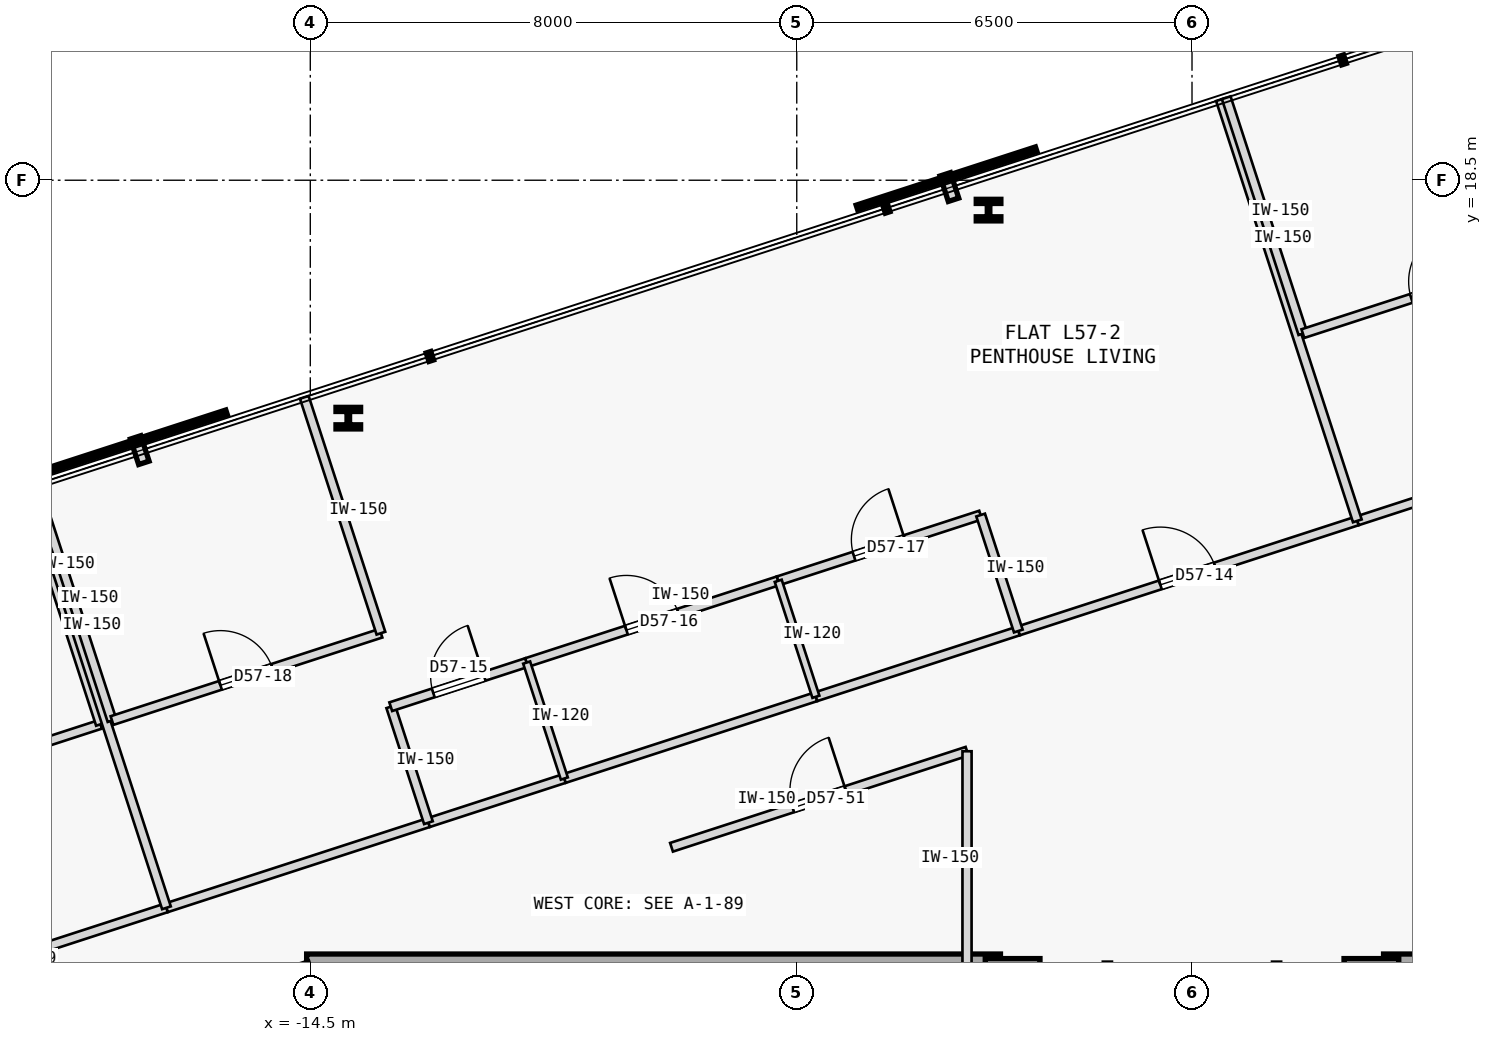
"""IFC4 building model, lengths in metres.
Left out: names, types, materials, properties, quantities, classifications, styles, units other than length and angle.
Written with IfcOpenShell. Run it as: python <this file> out.ifc"""

import sys

from ifc_helpers import new_model, si_unit, direction, frame, frame_2d, origin, origin_2d, place, context, subcontext, project, spatial, rectangle, i_section, extrude, element, fill, save


model = new_model("IFC4")
c1 = context("Model", 3, precision=1e-05, world=origin(), true_north=direction((0.0, 1.0)))
c2 = subcontext(c1, "Body", "Model", "MODEL_VIEW")
j1 = project(units=[si_unit("LENGTHUNIT", "METRE"), si_unit("PLANEANGLEUNIT", "RADIAN")], contexts=[c1])
p1 = place(None, origin())
s1 = spatial("IfcSite", under=j1, at=p1, CompositionType="ELEMENT")
p2 = place(p1, origin())
s2 = spatial("IfcBuilding", under=s1, at=p2, CompositionType="ELEMENT")
p3 = place(p2, frame((0.0, 0.0, 217.6)))
s3 = spatial("IfcBuildingStorey", under=s2, at=p3, CompositionType="ELEMENT", Elevation=217.6)
for number, where, z_axis, x_axis in (
    (1, (-2.95, 5.25, 0.0), (0.0, 0.0, 1.0), (1.0, 0.0, 0.0)),
    (2, (2.95, 5.25, 0.0), (0.0, 0.0, 1.0), (1.0, 0.0, 0.0)),
):
    element("IfcColumn", number, at=place(p3, frame(where, z_axis=z_axis, x_axis=x_axis)), inside=s3, PredefinedType="COLUMN", context=c2, shape_type="SweptSolid", body=[
        extrude(rectangle(XDim=0.9, YDim=0.9, at=origin_2d()), origin(), (0.0, 0.0, 1.0), 3.35),
    ])
for number, where, z_axis, x_axis in (
    (3, (-14.56, 5.6, 0.0), (0.0, 0.0, 1.0), (1.0, 0.0, 0.0)),
    (4, (3.15, 5.6, 0.0), (0.0, 0.0, 1.0), (1.0, 0.0, 0.0)),
):
    element("IfcWall", number, at=place(p3, frame(where, z_axis=z_axis, x_axis=x_axis)), inside=s3, PredefinedType="SHEAR", context=c2, shape_type="SweptSolid", body=[
        extrude(rectangle(XDim=11.41, YDim=0.35, at=frame_2d((5.705, 0.0))), origin(), (0.0, 0.0, 1.0), 3.125),
    ])
for number, where, z_axis, x_axis in (
    (5, (-3.346, 18.009, 0.0), (0.0, 0.0, 1.0), (1.0, 0.0, 0.0)),
    (6, (-13.875, 14.587, 0.0), (0.0, 0.0, 1.0), (1.0, 0.0, 0.0)),
):
    element("IfcColumn", number, at=place(p3, frame(where, z_axis=z_axis, x_axis=x_axis)), inside=s3, PredefinedType="COLUMN", context=c2, shape_type="SweptSolid", body=[
        extrude(i_section(OverallWidth=0.405, OverallDepth=0.355, WebThickness=0.042, FlangeThickness=0.068, FilletRadius=0.015, at=origin_2d()), origin(), (0.0, 0.0, 1.0), 3.35),
    ])
p4 = place(p3, frame((-1.391, -5.65, 0.0), z_axis=(0.0, 0.0, 1.0), x_axis=(-8.6422954e-05, 0.999999996266, 0.0)))
e7 = element("IfcWall", 7, at=p4, inside=s3, PredefinedType="PARTITIONING", context=c2, shape_type="SweptSolid", body=[
    extrude(rectangle(XDim=11.3, YDim=0.15, at=frame_2d((5.65, 0.0))), origin(), (0.0, 0.0, 1.0), 3.125),
])
p5 = place(p4, frame((5.175, 0.0, 0.0)))
e8 = element("IfcOpeningElement", 8, at=p5, cuts=e7, PredefinedType="OPENING", context=c2, shape_type="SweptSolid", body=[
    extrude(rectangle(XDim=0.95, YDim=2.15, at=frame_2d((0.475, 1.075))), frame((0.0, 0.085, 0.0), z_axis=(0.0, -1.0, 0.0), x_axis=(1.0, 0.0, 0.0)), (0.0, 0.0, 1.0), 0.17),
])
p6 = place(p3, frame((1.391, -5.648, 0.0), z_axis=(0.0, 0.0, 1.0), x_axis=(-4.3218947e-05, 0.999999999066, 0.0)))
e9 = element("IfcWall", 9, at=p6, inside=s3, PredefinedType="PARTITIONING", context=c2, shape_type="SweptSolid", body=[
    extrude(rectangle(XDim=11.298, YDim=0.15, at=frame_2d((5.649, 0.0))), origin(), (0.0, 0.0, 1.0), 3.125),
])
p7 = place(p3, frame((-22.01, 4.864, 0.0), z_axis=(0.0, 0.0, 1.0), x_axis=(0.951061595649, 0.309001361293, 0.0)))
e10 = element("IfcWall", 10, at=p7, inside=s3, PredefinedType="PARTITIONING", context=c2, shape_type="SweptSolid", body=[
    extrude(rectangle(XDim=5.409, YDim=0.15, at=frame_2d((2.705, 0.0))), origin(), (0.0, 0.0, 1.0), 3.125),
])
p8 = place(p7, frame((2.229, 0.0, 0.0)))
e11 = element("IfcOpeningElement", 11, at=p8, cuts=e10, PredefinedType="OPENING", context=c2, shape_type="SweptSolid", body=[
    extrude(rectangle(XDim=0.95, YDim=2.15, at=frame_2d((0.475, 1.075))), frame((0.0, 0.085, 0.0), z_axis=(0.0, -1.0, 0.0), x_axis=(1.0, 0.0, 0.0)), (0.0, 0.0, 1.0), 0.17),
])
p9 = place(p3, frame((-16.865, 6.535, 0.0), z_axis=(0.0, 0.0, 1.0), x_axis=(0.951049118272, 0.309039762222, 0.0)))
e12 = element("IfcWall", 12, at=p9, inside=s3, PredefinedType="PARTITIONING", context=c2, shape_type="SweptSolid", body=[
    extrude(rectangle(XDim=4.53, YDim=0.15, at=frame_2d((2.265, 0.0))), origin(), (0.0, 0.0, 1.0), 3.125),
])
p10 = place(p3, frame((-2.856, 11.087, 0.0), z_axis=(0.0, 0.0, 1.0), x_axis=(0.95106314138, 0.308996603718, 0.0)))
e13 = element("IfcWall", 13, at=p10, inside=s3, PredefinedType="PARTITIONING", context=c2, shape_type="SweptSolid", body=[
    extrude(rectangle(XDim=5.862, YDim=0.15, at=frame_2d((2.931, 0.0))), origin(), (0.0, 0.0, 1.0), 3.125),
])
p11 = place(p10, frame((2.456, 0.0, 0.0)))
e14 = element("IfcOpeningElement", 14, at=p11, cuts=e13, PredefinedType="OPENING", context=c2, shape_type="SweptSolid", body=[
    extrude(rectangle(XDim=0.95, YDim=2.15, at=frame_2d((0.475, 1.075))), frame((0.0, 0.085, 0.0), z_axis=(0.0, -1.0, 0.0), x_axis=(1.0, 0.0, 0.0)), (0.0, 0.0, 1.0), 0.17),
])
p12 = place(p3, frame((-12.557, 7.935, 0.0), z_axis=(0.0, 0.0, 1.0), x_axis=(0.951045519245, 0.309050837767, 0.0)))
e15 = element("IfcWall", 15, at=p12, inside=s3, PredefinedType="PARTITIONING", context=c2, shape_type="SweptSolid", body=[
    extrude(rectangle(XDim=2.35, YDim=0.15, at=frame_2d((1.175, 0.0))), origin(), (0.0, 0.0, 1.0), 3.125),
])
p13 = place(p3, frame((-10.322, 8.661, 0.0), z_axis=(0.0, 0.0, 1.0), x_axis=(0.951052627573, 0.309028962374, 0.0)))
e16 = element("IfcWall", 16, at=p13, inside=s3, PredefinedType="PARTITIONING", context=c2, shape_type="SweptSolid", body=[
    extrude(rectangle(XDim=4.35, YDim=0.15, at=frame_2d((2.175, 0.0))), origin(), (0.0, 0.0, 1.0), 3.125),
])
p14 = place(p3, frame((-6.185, 10.006, 0.0), z_axis=(0.0, 0.0, 1.0), x_axis=(0.951062257173, 0.308999325213, 0.0)))
e17 = element("IfcWall", 17, at=p14, inside=s3, PredefinedType="PARTITIONING", context=c2, shape_type="SweptSolid", body=[
    extrude(rectangle(XDim=3.5, YDim=0.15, at=frame_2d((1.75, 0.0))), origin(), (0.0, 0.0, 1.0), 3.125),
])
p15 = place(p3, frame((2.719, 12.898, 0.0), z_axis=(0.0, 0.0, 1.0), x_axis=(0.951053341802, 0.309026764289, 0.0)))
e18 = element("IfcWall", 18, at=p15, inside=s3, PredefinedType="PARTITIONING", context=c2, shape_type="SweptSolid", body=[
    extrude(rectangle(XDim=4.654, YDim=0.15, at=frame_2d((2.327, 0.0))), origin(), (0.0, 0.0, 1.0), 3.125),
])
p16 = place(p3, frame((-17.792, 4.531, 0.0), z_axis=(0.0, 0.0, 1.0), x_axis=(0.951047546178, 0.309044600193, 0.0)))
e19 = element("IfcWall", 19, at=p16, inside=s3, PredefinedType="PARTITIONING", context=c2, shape_type="SweptSolid", body=[
    extrude(rectangle(XDim=3.461, YDim=0.15, at=frame_2d((1.73, 0.0))), origin(), (0.0, 0.0, 1.0), 3.125),
])
p17 = place(p16, frame((0.302, 0.0, 0.0)))
e20 = element("IfcOpeningElement", 20, at=p17, cuts=e19, PredefinedType="OPENING", context=c2, shape_type="SweptSolid", body=[
    extrude(rectangle(XDim=0.92, YDim=2.15, at=frame_2d((0.46, 1.075))), frame((0.0, 0.085, 0.0), z_axis=(0.0, -1.0, 0.0), x_axis=(1.0, 0.0, 0.0)), (0.0, 0.0, 1.0), 0.17),
])
p18 = place(p3, frame((-8.56, 7.531, 0.0), z_axis=(0.0, 0.0, 1.0), x_axis=(0.951054430751, 0.309023412946, 0.0)))
e21 = element("IfcWall", 21, at=p18, inside=s3, PredefinedType="PARTITIONING", context=c2, shape_type="SweptSolid", body=[
    extrude(rectangle(XDim=5.11, YDim=0.15, at=frame_2d((2.555, 0.0))), origin(), (0.0, 0.0, 1.0), 3.125),
])
p19 = place(p18, frame((2.095, 0.0, 0.0)))
e22 = element("IfcOpeningElement", 22, at=p19, cuts=e21, PredefinedType="OPENING", context=c2, shape_type="SweptSolid", body=[
    extrude(rectangle(XDim=0.92, YDim=2.15, at=frame_2d((0.46, 1.075))), frame((0.0, 0.085, 0.0), z_axis=(0.0, -1.0, 0.0), x_axis=(1.0, 0.0, 0.0)), (0.0, 0.0, 1.0), 0.17),
])
p20 = place(p3, frame((-3.7, 5.6, 0.0), z_axis=(0.0, 0.0, 1.0), x_axis=(0.000139120755, 0.999999990323, 0.0)))
e23 = element("IfcWall", 23, at=p20, inside=s3, PredefinedType="PARTITIONING", context=c2, shape_type="SweptSolid", body=[
    extrude(rectangle(XDim=3.51, YDim=0.15, at=frame_2d((1.755, 0.0))), origin(), (0.0, 0.0, 1.0), 3.125),
])
p21 = place(p3, frame((-22.374, 8.115, 0.0), z_axis=(0.0, 0.0, 1.0), x_axis=(0.951055286502, 0.309020779263, 0.0)))
e24 = element("IfcWall", 24, at=p21, inside=s3, PredefinedType="PARTITIONING", context=c2, shape_type="SweptSolid", body=[
    extrude(rectangle(XDim=4.65, YDim=0.15, at=frame_2d((2.325, 0.0))), origin(), (0.0, 0.0, 1.0), 3.125),
])
p22 = place(p21, frame((1.875, 0.0, 0.0)))
e25 = element("IfcOpeningElement", 25, at=p22, cuts=e24, PredefinedType="OPENING", context=c2, shape_type="SweptSolid", body=[
    extrude(rectangle(XDim=0.9, YDim=2.15, at=frame_2d((0.45, 1.075))), frame((0.0, 0.085, 0.0), z_axis=(0.0, -1.0, 0.0), x_axis=(1.0, 0.0, 0.0)), (0.0, 0.0, 1.0), 0.17),
])
p23 = place(p3, frame((-17.951, 9.552, 0.0), z_axis=(0.0, 0.0, 1.0), x_axis=(-0.309018403393, 0.951056058476, 0.0)))
e26 = element("IfcWall", 26, at=p23, inside=s3, PredefinedType="PARTITIONING", context=c2, shape_type="SweptSolid", body=[
    extrude(rectangle(XDim=4.079, YDim=0.15, at=frame_2d((2.04, 0.0))), origin(), (0.0, 0.0, 1.0), 3.125),
])
p24 = place(p3, frame((-16.865, 6.535, 0.0), z_axis=(0.0, 0.0, 1.0), x_axis=(-0.309029230739, 0.951052540372, 0.0)))
e27 = element("IfcWall", 27, at=p24, inside=s3, PredefinedType="PARTITIONING", context=c2, shape_type="SweptSolid", body=[
    extrude(rectangle(XDim=7.284, YDim=0.15, at=frame_2d((3.642, 0.0))), origin(), (0.0, 0.0, 1.0), 3.125),
])
p25 = place(p3, frame((-12.557, 7.935, 0.0), z_axis=(0.0, 0.0, 1.0), x_axis=(-0.308912611775, 0.951090425925, 0.0)))
e28 = element("IfcWall", 28, at=p25, inside=s3, PredefinedType="PARTITIONING", context=c2, shape_type="SweptSolid", body=[
    extrude(rectangle(XDim=2.005, YDim=0.15, at=frame_2d((1.002, 0.0))), origin(), (0.0, 0.0, 1.0), 3.125),
])
p26 = place(p3, frame((-13.177, 9.842, 0.0), z_axis=(0.0, 0.0, 1.0), x_axis=(0.951066131077, 0.308987401554, 0.0)))
e29 = element("IfcWall", 29, at=p26, inside=s3, PredefinedType="PARTITIONING", context=c2, shape_type="SweptSolid", body=[
    extrude(rectangle(XDim=2.35, YDim=0.15, at=frame_2d((1.175, 0.0))), origin(), (0.0, 0.0, 1.0), 3.125),
])
p27 = place(p26, frame((0.735, 0.0, 0.0)))
e30 = element("IfcOpeningElement", 30, at=p27, cuts=e29, PredefinedType="OPENING", context=c2, shape_type="SweptSolid", body=[
    extrude(rectangle(XDim=0.88, YDim=2.15, at=frame_2d((0.44, 1.075))), frame((0.0, 0.085, 0.0), z_axis=(0.0, -1.0, 0.0), x_axis=(1.0, 0.0, 0.0)), (0.0, 0.0, 1.0), 0.17),
])
p28 = place(p3, frame((-10.942, 10.568, 0.0), z_axis=(0.0, 0.0, 1.0), x_axis=(0.951057987102, 0.309012467661, 0.0)))
e31 = element("IfcWall", 31, at=p28, inside=s3, PredefinedType="PARTITIONING", context=c2, shape_type="SweptSolid", body=[
    extrude(rectangle(XDim=4.35, YDim=0.15, at=frame_2d((2.175, 0.0))), origin(), (0.0, 0.0, 1.0), 3.125),
])
p29 = place(p28, frame((1.725, 0.0, 0.0)))
e32 = element("IfcOpeningElement", 32, at=p29, cuts=e31, PredefinedType="OPENING", context=c2, shape_type="SweptSolid", body=[
    extrude(rectangle(XDim=0.9, YDim=2.15, at=frame_2d((0.45, 1.075))), frame((0.0, 0.085, 0.0), z_axis=(0.0, -1.0, 0.0), x_axis=(1.0, 0.0, 0.0)), (0.0, 0.0, 1.0), 0.17),
])
p30 = place(p3, frame((-6.805, 11.912, 0.0), z_axis=(0.0, 0.0, 1.0), x_axis=(0.951055596592, 0.309019824916, 0.0)))
e33 = element("IfcWall", 33, at=p30, inside=s3, PredefinedType="PARTITIONING", context=c2, shape_type="SweptSolid", body=[
    extrude(rectangle(XDim=3.5, YDim=0.15, at=frame_2d((1.75, 0.0))), origin(), (0.0, 0.0, 1.0), 3.125),
])
p31 = place(p30, frame((1.31, 0.0, 0.0)))
e34 = element("IfcOpeningElement", 34, at=p31, cuts=e33, PredefinedType="OPENING", context=c2, shape_type="SweptSolid", body=[
    extrude(rectangle(XDim=0.88, YDim=2.15, at=frame_2d((0.44, 1.075))), frame((0.0, 0.085, 0.0), z_axis=(0.0, -1.0, 0.0), x_axis=(1.0, 0.0, 0.0)), (0.0, 0.0, 1.0), 0.17),
])
p32 = place(p3, frame((-2.856, 11.087, 0.0), z_axis=(0.0, 0.0, 1.0), x_axis=(-0.309058537449, 0.951043017129, 0.0)))
e35 = element("IfcWall", 35, at=p32, inside=s3, PredefinedType="PARTITIONING", context=c2, shape_type="SweptSolid", body=[
    extrude(rectangle(XDim=2.005, YDim=0.15, at=frame_2d((1.002, 0.0))), origin(), (0.0, 0.0, 1.0), 3.125),
])
p33 = place(p3, frame((-17.761, 9.614, 0.0), z_axis=(0.0, 0.0, 1.0), x_axis=(-0.309018403393, 0.951056058476, 0.0)))
e36 = element("IfcWall", 36, at=p33, inside=s3, PredefinedType="PARTITIONING", context=c2, shape_type="SweptSolid", body=[
    extrude(rectangle(XDim=4.079, YDim=0.15, at=frame_2d((2.04, 0.0))), origin(), (0.0, 0.0, 1.0), 3.125),
])
p34 = place(p3, frame((-17.761, 9.614, 0.0), z_axis=(0.0, 0.0, 1.0), x_axis=(0.951050272606, 0.309036209813, 0.0)))
e37 = element("IfcWall", 37, at=p34, inside=s3, PredefinedType="PARTITIONING", context=c2, shape_type="SweptSolid", body=[
    extrude(rectangle(XDim=4.65, YDim=0.15, at=frame_2d((2.325, 0.0))), origin(), (0.0, 0.0, 1.0), 3.125),
])
p35 = place(p34, frame((1.875, 0.0, 0.0)))
e38 = element("IfcOpeningElement", 38, at=p35, cuts=e37, PredefinedType="OPENING", context=c2, shape_type="SweptSolid", body=[
    extrude(rectangle(XDim=0.9, YDim=2.15, at=frame_2d((0.45, 1.075))), frame((0.0, 0.085, 0.0), z_axis=(0.0, -1.0, 0.0), x_axis=(1.0, 0.0, 0.0)), (0.0, 0.0, 1.0), 0.17),
])
p36 = place(p3, frame((-13.338, 11.051, 0.0), z_axis=(0.0, 0.0, 1.0), x_axis=(-0.309018403393, 0.951056058476, 0.0)))
e39 = element("IfcWall", 39, at=p36, inside=s3, PredefinedType="PARTITIONING", context=c2, shape_type="SweptSolid", body=[
    extrude(rectangle(XDim=4.079, YDim=0.15, at=frame_2d((2.04, 0.0))), origin(), (0.0, 0.0, 1.0), 3.125),
])
p37 = place(p3, frame((2.719, 12.898, 0.0), z_axis=(0.0, 0.0, 1.0), x_axis=(-0.308998913866, 0.951062390819, 0.0)))
e40 = element("IfcWall", 40, at=p37, inside=s3, PredefinedType="PARTITIONING", context=c2, shape_type="SweptSolid", body=[
    extrude(rectangle(XDim=7.284, YDim=0.15, at=frame_2d((3.642, 0.0))), origin(), (0.0, 0.0, 1.0), 3.125),
])
for number, where, z_axis, x_axis in (
    (41, (-10.322, 8.661, 0.0), (0.0, 0.0, 1.0), (-0.309, 0.951, 0.0)),
    (42, (-6.185, 10.006, 0.0), (0.0, 0.0, 1.0), (-0.309, 0.951, 0.0)),
):
    element("IfcWall", number, at=place(p3, frame(where, z_axis=z_axis, x_axis=x_axis)), inside=s3, PredefinedType="PARTITIONING", context=c2, shape_type="SweptSolid", body=[
        extrude(rectangle(XDim=2.005, YDim=0.12, at=frame_2d((1.002, 0.0))), origin(), (0.0, 0.0, 1.0), 3.125),
    ])
p38 = place(p3, frame((1.823, 15.978, 0.0), z_axis=(0.0, 0.0, 1.0), x_axis=(-0.309018403393, 0.951056058476, 0.0)))
e43 = element("IfcWall", 43, at=p38, inside=s3, PredefinedType="PARTITIONING", context=c2, shape_type="SweptSolid", body=[
    extrude(rectangle(XDim=4.079, YDim=0.15, at=frame_2d((2.04, 0.0))), origin(), (0.0, 0.0, 1.0), 3.125),
])
p39 = place(p3, frame((1.823, 15.978, 0.0), z_axis=(0.0, 0.0, 1.0), x_axis=(0.951050272606, 0.309036209813, 0.0)))
e44 = element("IfcWall", 44, at=p39, inside=s3, PredefinedType="PARTITIONING", context=c2, shape_type="SweptSolid", body=[
    extrude(rectangle(XDim=4.65, YDim=0.15, at=frame_2d((2.325, 0.0))), origin(), (0.0, 0.0, 1.0), 3.125),
])
p40 = place(p39, frame((1.875, 0.0, 0.0)))
e45 = element("IfcOpeningElement", 45, at=p40, cuts=e44, PredefinedType="OPENING", context=c2, shape_type="SweptSolid", body=[
    extrude(rectangle(XDim=0.9, YDim=2.15, at=frame_2d((0.45, 1.075))), frame((0.0, 0.085, 0.0), z_axis=(0.0, -1.0, 0.0), x_axis=(1.0, 0.0, 0.0)), (0.0, 0.0, 1.0), 0.17),
])
p41 = place(p11, origin())
e46 = element("IfcDoor", 46, at=p41, inside=s3, OperationType="SINGLE_SWING_LEFT", PredefinedType="DOOR", context=c2, shape_type="SweptSolid", body=[
    extrude(rectangle(XDim=0.95, YDim=2.15, at=frame_2d((0.475, 1.075))), frame((0.0, 0.025, 0.0), z_axis=(0.0, -1.0, 0.0), x_axis=(1.0, 0.0, 0.0)), (0.0, 0.0, 1.0), 0.05),
])
fill(e14, e46)
p42 = place(p27, origin())
e47 = element("IfcDoor", 47, at=p42, inside=s3, OperationType="SINGLE_SWING_RIGHT", PredefinedType="DOOR", context=c2, shape_type="SweptSolid", body=[
    extrude(rectangle(XDim=0.88, YDim=2.15, at=frame_2d((0.44, 1.075))), frame((0.0, 0.025, 0.0), z_axis=(0.0, -1.0, 0.0), x_axis=(1.0, 0.0, 0.0)), (0.0, 0.0, 1.0), 0.05),
])
fill(e30, e47)
p43 = place(p29, origin())
e48 = element("IfcDoor", 48, at=p43, inside=s3, OperationType="SINGLE_SWING_LEFT", PredefinedType="DOOR", context=c2, shape_type="SweptSolid", body=[
    extrude(rectangle(XDim=0.9, YDim=2.15, at=frame_2d((0.45, 1.075))), frame((0.0, 0.025, 0.0), z_axis=(0.0, -1.0, 0.0), x_axis=(1.0, 0.0, 0.0)), (0.0, 0.0, 1.0), 0.05),
])
fill(e32, e48)
p44 = place(p31, origin())
e49 = element("IfcDoor", 49, at=p44, inside=s3, OperationType="SINGLE_SWING_RIGHT", PredefinedType="DOOR", context=c2, shape_type="SweptSolid", body=[
    extrude(rectangle(XDim=0.88, YDim=2.15, at=frame_2d((0.44, 1.075))), frame((0.0, 0.025, 0.0), z_axis=(0.0, -1.0, 0.0), x_axis=(1.0, 0.0, 0.0)), (0.0, 0.0, 1.0), 0.05),
])
fill(e34, e49)
p45 = place(p35, origin())
e50 = element("IfcDoor", 50, at=p45, inside=s3, OperationType="SINGLE_SWING_LEFT", PredefinedType="DOOR", context=c2, shape_type="SweptSolid", body=[
    extrude(rectangle(XDim=0.9, YDim=2.15, at=frame_2d((0.45, 1.075))), frame((0.0, 0.025, 0.0), z_axis=(0.0, -1.0, 0.0), x_axis=(1.0, 0.0, 0.0)), (0.0, 0.0, 1.0), 0.05),
])
fill(e38, e50)
p46 = place(p40, origin())
e51 = element("IfcDoor", 51, at=p46, inside=s3, OperationType="SINGLE_SWING_RIGHT", PredefinedType="DOOR", context=c2, shape_type="SweptSolid", body=[
    extrude(rectangle(XDim=0.9, YDim=2.15, at=frame_2d((0.45, 1.075))), frame((0.0, 0.025, 0.0), z_axis=(0.0, -1.0, 0.0), x_axis=(1.0, 0.0, 0.0)), (0.0, 0.0, 1.0), 0.05),
])
fill(e45, e51)
p47 = place(p19, origin())
e52 = element("IfcDoor", 52, at=p47, inside=s3, OperationType="SINGLE_SWING_RIGHT", PredefinedType="DOOR", context=c2, shape_type="SweptSolid", body=[
    extrude(rectangle(XDim=0.92, YDim=2.15, at=frame_2d((0.46, 1.075))), frame((0.0, 0.025, 0.0), z_axis=(0.0, -1.0, 0.0), x_axis=(1.0, 0.0, 0.0)), (0.0, 0.0, 1.0), 0.05),
])
fill(e22, e52)
save(model, sys.argv[1])
